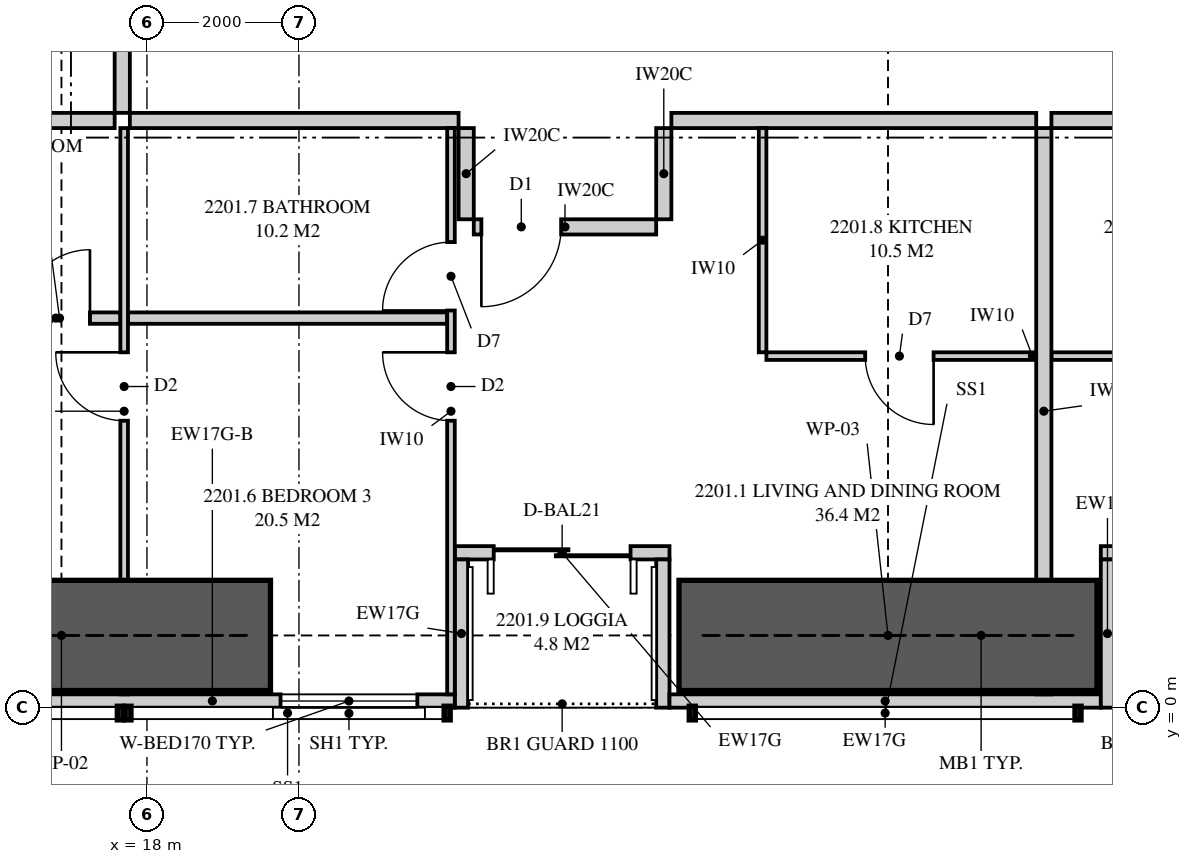
"""IFC4 building model, lengths in metres.
Left out: names, types, materials, properties, quantities, classifications, styles, units other than length and angle.
Written with IfcOpenShell. Run it as: python <this file> out.ifc"""

import sys

from ifc_helpers import new_model, si_unit, direction, frame, frame_2d, origin, place, context, subcontext, project, spatial, polyline, rectangle, outline, extrude, element, fill, save


model = new_model("IFC4")
c1 = context("Model", 3, precision=1e-05, world=origin(), true_north=direction((0.0, 1.0)))
c2 = subcontext(c1, "Body", "Model", "MODEL_VIEW")
j1 = project(units=[si_unit("LENGTHUNIT", "METRE"), si_unit("PLANEANGLEUNIT", "RADIAN")], contexts=[c1])
p1 = place(None, origin())
s1 = spatial("IfcSite", under=j1, at=p1, CompositionType="ELEMENT")
p2 = place(p1, origin())
s2 = spatial("IfcBuilding", under=s1, at=p2, CompositionType="ELEMENT")
p3 = place(p2, frame((0.0, 0.0, 84.75)))
s3 = spatial("IfcBuildingStorey", under=s2, at=p3, CompositionType="ELEMENT", Elevation=84.75)
p4 = place(p3, frame((15.671, 0.087, 0.0), z_axis=(0.0, 0.0, 1.0), x_axis=(1.0, 0.0, 0.0)))
e1 = element("IfcWall", 1, at=p4, inside=s3, PredefinedType="SOLIDWALL", context=c2, shape_type="SweptSolid", body=[
    extrude(rectangle(XDim=6.379, YDim=0.175, at=frame_2d((3.189, 0.0))), origin(), (0.0, 0.0, 1.0), 2.15),
])
p5 = place(p4, frame((4.087, 0.0, 0.4)))
e2 = element("IfcOpeningElement", 2, at=p5, cuts=e1, PredefinedType="OPENING", context=c2, shape_type="SweptSolid", body=[
    extrude(rectangle(XDim=1.8, YDim=1.7, at=frame_2d((0.9, 0.85))), frame((0.0, 0.097, 0.0), z_axis=(0.0, -1.0, 0.0), x_axis=(1.0, 0.0, 0.0)), (0.0, 0.0, 1.0), 0.195),
])
p6 = place(p3, frame((24.875, 0.087, 0.0), z_axis=(0.0, 0.0, 1.0), x_axis=(1.0, 0.0, 0.0)))
e3 = element("IfcWall", 3, at=p6, inside=s3, PredefinedType="SOLIDWALL", context=c2, shape_type="SweptSolid", body=[
    extrude(rectangle(XDim=5.675, YDim=0.175, at=frame_2d((2.837, 0.0))), origin(), (0.0, 0.0, 1.0), 2.15),
])
p7 = place(p3, frame((22.05, 2.038, 0.0), z_axis=(0.0, 0.0, 1.0), x_axis=(1.0, 0.0, 0.0)))
e4 = element("IfcWall", 4, at=p7, inside=s3, PredefinedType="SOLIDWALL", context=c2, shape_type="SweptSolid", body=[
    extrude(rectangle(XDim=2.825, YDim=0.175, at=frame_2d((1.413, 0.0))), origin(), (0.0, 0.0, 1.0), 2.15),
])
p8 = place(p7, frame((0.512, 0.0, 0.0)))
e5 = element("IfcOpeningElement", 5, at=p8, cuts=e4, PredefinedType="OPENING", context=c2, shape_type="SweptSolid", body=[
    extrude(rectangle(XDim=1.8, YDim=2.1, at=frame_2d((0.9, 1.05))), frame((0.0, 0.097, 0.0), z_axis=(0.0, -1.0, 0.0), x_axis=(1.0, 0.0, 0.0)), (0.0, 0.0, 1.0), 0.195),
])
for number, where, z_axis, x_axis in (
    (6, (22.137, 0.0, 0.0), (0.0, 0.0, 1.0), (0.0, 1.0, 0.0)),
    (7, (24.788, 0.0, 0.0), (0.0, 0.0, 1.0), (0.0, 1.0, 0.0)),
):
    element("IfcWall", number, at=place(p3, frame(where, z_axis=z_axis, x_axis=x_axis)), inside=s3, PredefinedType="SOLIDWALL", context=c2, shape_type="SweptSolid", body=[
        extrude(rectangle(XDim=1.95, YDim=0.175, at=frame_2d((0.975, 0.0))), origin(), (0.0, 0.0, 1.0), 2.15),
    ])
p9 = place(p3, frame((30.55, 2.038, 0.0), z_axis=(0.0, 0.0, 1.0), x_axis=(1.0, 0.0, 0.0)))
e8 = element("IfcWall", 8, at=p9, inside=s3, PredefinedType="SOLIDWALL", context=c2, shape_type="SweptSolid", body=[
    extrude(rectangle(XDim=3.05, YDim=0.175, at=frame_2d((1.525, 0.0))), origin(), (0.0, 0.0, 1.0), 2.15),
])
p10 = place(p9, frame((0.625, 0.0, 0.0)))
e9 = element("IfcOpeningElement", 9, at=p10, cuts=e8, PredefinedType="OPENING", context=c2, shape_type="SweptSolid", body=[
    extrude(rectangle(XDim=1.8, YDim=2.1, at=frame_2d((0.9, 1.05))), frame((0.0, 0.097, 0.0), z_axis=(0.0, -1.0, 0.0), x_axis=(1.0, 0.0, 0.0)), (0.0, 0.0, 1.0), 0.195),
])
p11 = place(p3, frame((30.637, 0.0, 0.0), z_axis=(0.0, 0.0, 1.0), x_axis=(0.0, 1.0, 0.0)))
e10 = element("IfcWall", 10, at=p11, inside=s3, PredefinedType="SOLIDWALL", context=c2, shape_type="SweptSolid", body=[
    extrude(rectangle(XDim=1.95, YDim=0.175, at=frame_2d((0.975, 0.0))), origin(), (0.0, 0.0, 1.0), 2.15),
])
p12 = place(p3, frame((29.8, 0.175, 0.0), z_axis=(0.0, 0.0, 1.0), x_axis=(0.0, 1.0, 0.0)))
e11 = element("IfcWall", 11, at=p12, inside=s3, PredefinedType="PARTITIONING", context=c2, shape_type="SweptSolid", body=[
    extrude(outline(polyline([(0.0, 0.0), (7.45, 0.0), (7.45, 3.11), (1.885, 3.11), (1.885, 2.15), (1.021, 2.15), (1.021, 1.986), (0.529, 1.986), (0.529, 2.15), (0.0, 2.15), (0.0, 0.0)])), frame((0.0, 0.1, 0.0), z_axis=(0.0, -1.0, 0.0), x_axis=(1.0, 0.0, 0.0)), (0.0, 0.0, 1.0), 0.2),
])
p13 = place(p3, frame((17.775, 7.725, 0.0), z_axis=(0.0, 0.0, 1.0), x_axis=(1.0, 0.0, 0.0)))
e12 = element("IfcWall", 12, at=p13, inside=s3, PredefinedType="PARTITIONING", context=c2, shape_type="SweptSolid", body=[
    extrude(rectangle(XDim=4.325, YDim=0.2, at=frame_2d((2.163, 0.0))), origin(), (0.0, 0.0, 1.0), 3.11),
])
p14 = place(p3, frame((17.7, 0.175, 0.0), z_axis=(0.0, 0.0, 1.0), x_axis=(0.0, 1.0, 0.0)))
e13 = element("IfcWall", 13, at=p14, inside=s3, PredefinedType="PARTITIONING", context=c2, shape_type="SweptSolid", body=[
    extrude(outline(polyline([(1.835, 2.15), (0.0, 2.15), (0.0, 0.0), (0.529, 0.0), (0.529, 0.625), (1.021, 0.625), (1.021, 0.0), (7.45, 0.0), (7.45, 3.11), (1.835, 3.11), (1.835, 2.15)]), holes=[polyline([(1.021, 1.075), (0.529, 1.075), (0.529, 1.905), (1.021, 1.905), (1.021, 1.075)])]), frame((0.0, 0.05, 0.0), z_axis=(0.0, -1.0, 0.0), x_axis=(1.0, 0.0, 0.0)), (0.0, 0.0, 1.0), 0.1),
])
p15 = place(p14, frame((3.6, 0.0, 0.0)))
e14 = element("IfcOpeningElement", 14, at=p15, cuts=e13, PredefinedType="OPENING", context=c2, shape_type="SweptSolid", body=[
    extrude(rectangle(XDim=0.9, YDim=2.1, at=frame_2d((0.45, 1.05))), frame((0.0, 0.06, 0.0), z_axis=(0.0, -1.0, 0.0), x_axis=(1.0, 0.0, 0.0)), (0.0, 0.0, 1.0), 0.12),
])
p16 = place(p3, frame((22.0, 0.175, 0.0), z_axis=(0.0, 0.0, 1.0), x_axis=(0.0, 1.0, 0.0)))
e15 = element("IfcWall", 15, at=p16, inside=s3, PredefinedType="PARTITIONING", context=c2, shape_type="SweptSolid", body=[
    extrude(outline(polyline([(0.0, 0.0), (7.45, 0.0), (7.45, 3.11), (1.835, 3.11), (1.835, 2.15), (0.0, 2.15), (0.0, 3.11), (0.0, 0.0)])), frame((0.0, 0.05, 0.0), z_axis=(0.0, -1.0, 0.0), x_axis=(1.0, 0.0, 0.0)), (0.0, 0.0, 1.0), 0.1),
])
p17 = place(p16, frame((3.6, 0.0, 0.0)))
e16 = element("IfcOpeningElement", 16, at=p17, cuts=e15, PredefinedType="OPENING", context=c2, shape_type="SweptSolid", body=[
    extrude(rectangle(XDim=0.9, YDim=2.1, at=frame_2d((0.45, 1.05))), frame((0.0, 0.06, 0.0), z_axis=(0.0, -1.0, 0.0), x_axis=(1.0, 0.0, 0.0)), (0.0, 0.0, 1.0), 0.12),
])
p18 = place(p16, frame((5.05, 0.0, 0.0)))
e17 = element("IfcOpeningElement", 17, at=p18, cuts=e15, PredefinedType="OPENING", context=c2, shape_type="SweptSolid", body=[
    extrude(rectangle(XDim=0.9, YDim=2.1, at=frame_2d((0.45, 1.05))), frame((0.0, 0.06, 0.0), z_axis=(0.0, -1.0, 0.0), x_axis=(1.0, 0.0, 0.0)), (0.0, 0.0, 1.0), 0.12),
])
p19 = place(p3, frame((11.75, 5.125, 0.0), z_axis=(0.0, 0.0, 1.0), x_axis=(1.0, 0.0, 0.0)))
e18 = element("IfcWall", 18, at=p19, inside=s3, PredefinedType="PLUMBINGWALL", context=c2, shape_type="SweptSolid", body=[
    extrude(outline(polyline([(0.0, 0.0), (5.9, 0.0), (5.9, 3.11), (5.446, 3.11), (5.446, 2.531), (4.804, 2.531), (4.804, 3.11), (0.0, 3.11), (0.0, 0.0)])), frame((0.0, 0.075, 0.0), z_axis=(0.0, -1.0, 0.0), x_axis=(1.0, 0.0, 0.0)), (0.0, 0.0, 1.0), 0.15),
])
p20 = place(p19, frame((4.6, 0.0, 0.0)))
e19 = element("IfcOpeningElement", 19, at=p20, cuts=e18, PredefinedType="OPENING", context=c2, shape_type="SweptSolid", body=[
    extrude(rectangle(XDim=0.9, YDim=2.1, at=frame_2d((0.45, 1.05))), frame((0.0, 0.085, 0.0), z_axis=(0.0, -1.0, 0.0), x_axis=(1.0, 0.0, 0.0)), (0.0, 0.0, 1.0), 0.17),
])
p21 = place(p3, frame((17.75, 5.125, 0.0), z_axis=(0.0, 0.0, 1.0), x_axis=(1.0, 0.0, 0.0)))
e20 = element("IfcWall", 20, at=p21, inside=s3, PredefinedType="PLUMBINGWALL", context=c2, shape_type="SweptSolid", body=[
    extrude(rectangle(XDim=4.2, YDim=0.15, at=frame_2d((2.1, 0.0))), origin(), (0.0, 0.0, 1.0), 3.11),
])
p22 = place(p3, frame((26.15, 4.625, 0.0), z_axis=(0.0, 0.0, 1.0), x_axis=(1.0, 0.0, 0.0)))
e21 = element("IfcWall", 21, at=p22, inside=s3, PredefinedType="PARTITIONING", context=c2, shape_type="SweptSolid", body=[
    extrude(outline(polyline([(0.0, 0.0), (3.55, 0.0), (3.55, 3.11), (1.896, 3.11), (1.896, 2.531), (1.304, 2.531), (1.304, 3.11), (0.0, 3.11), (0.0, 0.0)])), frame((0.0, 0.05, 0.0), z_axis=(0.0, -1.0, 0.0), x_axis=(1.0, 0.0, 0.0)), (0.0, 0.0, 1.0), 0.1),
])
p23 = place(p22, frame((1.3, 0.0, 0.0)))
e22 = element("IfcOpeningElement", 22, at=p23, cuts=e21, PredefinedType="OPENING", context=c2, shape_type="SweptSolid", body=[
    extrude(rectangle(XDim=0.9, YDim=2.1, at=frame_2d((0.45, 1.05))), frame((0.0, 0.06, 0.0), z_axis=(0.0, -1.0, 0.0), x_axis=(1.0, 0.0, 0.0)), (0.0, 0.0, 1.0), 0.12),
])
p24 = place(p3, frame((26.1, 4.675, 0.0), z_axis=(0.0, 0.0, 1.0), x_axis=(0.0, 1.0, 0.0)))
e23 = element("IfcWall", 23, at=p24, inside=s3, PredefinedType="PARTITIONING", context=c2, shape_type="SweptSolid", body=[
    extrude(rectangle(XDim=2.95, YDim=0.1, at=frame_2d((1.475, 0.0))), origin(), (0.0, 0.0, 1.0), 3.11),
])
p25 = place(p3, frame((29.9, 7.725, 0.0), z_axis=(0.0, 0.0, 1.0), x_axis=(1.0, 0.0, 0.0)))
e24 = element("IfcWall", 24, at=p25, inside=s3, PredefinedType="PARTITIONING", context=c2, shape_type="SweptSolid", body=[
    extrude(rectangle(XDim=7.825, YDim=0.2, at=frame_2d((3.913, 0.0))), origin(), (0.0, 0.0, 1.0), 3.11),
])
p26 = place(p25, frame((3.413, 0.0, 0.0)))
e25 = element("IfcOpeningElement", 25, at=p26, cuts=e24, PredefinedType="OPENING", context=c2, shape_type="SweptSolid", body=[
    extrude(rectangle(XDim=1.05, YDim=2.2, at=frame_2d((0.525, 1.1))), frame((0.0, 0.11, 0.0), z_axis=(0.0, -1.0, 0.0), x_axis=(1.0, 0.0, 0.0)), (0.0, 0.0, 1.0), 0.22),
])
p27 = place(p3, frame((29.9, 4.625, 0.0), z_axis=(0.0, 0.0, 1.0), x_axis=(1.0, 0.0, 0.0)))
e26 = element("IfcWall", 26, at=p27, inside=s3, PredefinedType="PARTITIONING", context=c2, shape_type="SweptSolid", body=[
    extrude(rectangle(XDim=3.25, YDim=0.1, at=frame_2d((1.625, 0.0))), origin(), (0.0, 0.0, 1.0), 3.11),
])
p28 = place(p27, frame((1.2, 0.0, 0.0)))
e27 = element("IfcOpeningElement", 27, at=p28, cuts=e26, PredefinedType="OPENING", context=c2, shape_type="SweptSolid", body=[
    extrude(rectangle(XDim=0.9, YDim=2.1, at=frame_2d((0.45, 1.05))), frame((0.0, 0.06, 0.0), z_axis=(0.0, -1.0, 0.0), x_axis=(1.0, 0.0, 0.0)), (0.0, 0.0, 1.0), 0.12),
])
p29 = place(p3, frame((6.0, 7.725, 0.0), z_axis=(0.0, 0.0, 1.0), x_axis=(1.0, 0.0, 0.0)))
e28 = element("IfcWall", 28, at=p29, inside=s3, PredefinedType="PARTITIONING", context=c2, shape_type="SweptSolid", body=[
    extrude(outline(polyline([(0.0, 0.0), (11.575, 0.0), (11.575, 3.11), (11.221, 3.11), (11.221, 2.531), (10.529, 2.531), (10.529, 3.11), (5.51, 3.11), (5.51, 2.51), (2.978, 2.51), (2.978, 2.531), (2.93, 2.531), (2.93, 2.15), (0.681, 2.15), (0.681, 3.11), (0.0, 3.11), (0.0, 0.0)])), frame((0.0, 0.1, 0.0), z_axis=(0.0, -1.0, 0.0), x_axis=(1.0, 0.0, 0.0)), (0.0, 0.0, 1.0), 0.2),
])
p30 = place(p3, frame((17.675, 7.825, 0.0), z_axis=(0.0, 0.0, 1.0), x_axis=(0.0, 1.0, 0.0)))
e29 = element("IfcWall", 29, at=p30, inside=s3, PredefinedType="PARTITIONING", context=c2, shape_type="SweptSolid", body=[
    extrude(outline(polyline([(0.0, 0.0), (9.075, 0.0), (9.075, 3.11), (3.096, 3.11), (3.096, 2.531), (2.404, 2.531), (2.404, 3.11), (0.0, 3.11), (0.0, 0.0)])), frame((0.0, 0.1, 0.0), z_axis=(0.0, -1.0, 0.0), x_axis=(1.0, 0.0, 0.0)), (0.0, 0.0, 1.0), 0.2),
])
p31 = place(p3, frame((24.9, 7.725, 0.0), z_axis=(0.0, 0.0, 1.0), x_axis=(1.0, 0.0, 0.0)))
e30 = element("IfcWall", 30, at=p31, inside=s3, PredefinedType="PARTITIONING", context=c2, shape_type="SweptSolid", body=[
    extrude(outline(polyline([(0.0, 0.0), (4.8, 0.0), (4.8, 3.11), (3.196, 3.11), (3.196, 2.531), (2.504, 2.531), (2.504, 3.11), (0.0, 3.11), (0.0, 0.0)])), frame((0.0, 0.1, 0.0), z_axis=(0.0, -1.0, 0.0), x_axis=(1.0, 0.0, 0.0)), (0.0, 0.0, 1.0), 0.2),
])
p32 = place(p3, frame((22.3, 6.325, 0.0), z_axis=(0.0, 0.0, 1.0), x_axis=(1.0, 0.0, 0.0)))
e31 = element("IfcWall", 31, at=p32, inside=s3, PredefinedType="PARTITIONING", context=c2, shape_type="SweptSolid", body=[
    extrude(rectangle(XDim=2.4, YDim=0.2, at=frame_2d((1.2, 0.0))), origin(), (0.0, 0.0, 1.0), 3.11),
])
p33 = place(p32, frame((0.1, 0.0, 0.0)))
e32 = element("IfcOpeningElement", 32, at=p33, cuts=e31, PredefinedType="OPENING", context=c2, shape_type="SweptSolid", body=[
    extrude(rectangle(XDim=1.05, YDim=2.2, at=frame_2d((0.525, 1.1))), frame((0.0, 0.11, 0.0), z_axis=(0.0, -1.0, 0.0), x_axis=(1.0, 0.0, 0.0)), (0.0, 0.0, 1.0), 0.22),
])
for number, where, z_axis, x_axis in (
    (33, (22.2, 7.625, 0.0), (0.0, 0.0, 1.0), (0.0, -1.0, 0.0)),
    (34, (24.8, 7.625, 0.0), (0.0, 0.0, 1.0), (0.0, -1.0, 0.0)),
):
    element("IfcWall", number, at=place(p3, frame(where, z_axis=z_axis, x_axis=x_axis)), inside=s3, PredefinedType="PARTITIONING", context=c2, shape_type="SweptSolid", body=[
        extrude(rectangle(XDim=1.2, YDim=0.2, at=frame_2d((0.6, 0.0))), origin(), (0.0, 0.0, 1.0), 3.11),
    ])
for number, where, z_axis, x_axis in (
    (35, (14.125, 0.95, 0.0), (0.0, 0.0, 1.0), (1.0, 0.0, 0.0)),
    (36, (25.0, 0.95, 0.0), (0.0, 0.0, 1.0), (1.0, 0.0, 0.0)),
):
    element("IfcWall", number, at=place(p3, frame(where, z_axis=z_axis, x_axis=x_axis)), inside=s3, PredefinedType="SHEAR", context=c2, shape_type="SweptSolid", body=[
        extrude(rectangle(XDim=5.5, YDim=1.45, at=frame_2d((2.75, 0.0))), origin(), (0.0, 0.0, 1.0), 3.35),
    ])
p34 = place(p5, origin())
e37 = element("IfcWindow", 37, at=p34, inside=s3, PartitioningType="SINGLE_PANEL", PredefinedType="WINDOW", context=c2, shape_type="SweptSolid", body=[
    extrude(rectangle(XDim=1.8, YDim=1.7, at=frame_2d((0.9, 0.85))), frame((0.0, 0.03, 0.0), z_axis=(0.0, -1.0, 0.0), x_axis=(1.0, 0.0, 0.0)), (0.0, 0.0, 1.0), 0.06),
])
fill(e2, e37)
p35 = place(p8, origin())
e38 = element("IfcDoor", 38, at=p35, inside=s3, OperationType="SLIDING_TO_LEFT", PredefinedType="DOOR", context=c2, shape_type="SweptSolid", body=[
    extrude(rectangle(XDim=1.8, YDim=2.1, at=frame_2d((0.9, 1.05))), frame((0.0, 0.025, 0.0), z_axis=(0.0, -1.0, 0.0), x_axis=(1.0, 0.0, 0.0)), (0.0, 0.0, 1.0), 0.05),
])
fill(e5, e38)
p36 = place(p33, frame((1.05, 0.0, 0.0), z_axis=(0.0, 0.0, 1.0), x_axis=(-1.0, 0.0, 0.0)))
e39 = element("IfcDoor", 39, at=p36, inside=s3, OperationType="SINGLE_SWING_RIGHT", PredefinedType="DOOR", context=c2, shape_type="SweptSolid", body=[
    extrude(rectangle(XDim=1.05, YDim=2.2, at=frame_2d((0.525, 1.1))), frame((0.0, 0.025, 0.0), z_axis=(0.0, -1.0, 0.0), x_axis=(1.0, 0.0, 0.0)), (0.0, 0.0, 1.0), 0.05),
])
fill(e32, e39)
p37 = place(p15, origin())
e40 = element("IfcDoor", 40, at=p37, inside=s3, OperationType="SINGLE_SWING_RIGHT", PredefinedType="DOOR", context=c2, shape_type="SweptSolid", body=[
    extrude(rectangle(XDim=0.9, YDim=2.1, at=frame_2d((0.45, 1.05))), frame((0.0, 0.025, 0.0), z_axis=(0.0, -1.0, 0.0), x_axis=(1.0, 0.0, 0.0)), (0.0, 0.0, 1.0), 0.05),
])
fill(e14, e40)
p38 = place(p20, origin())
e41 = element("IfcDoor", 41, at=p38, inside=s3, OperationType="SINGLE_SWING_RIGHT", PredefinedType="DOOR", context=c2, shape_type="SweptSolid", body=[
    extrude(rectangle(XDim=0.9, YDim=2.1, at=frame_2d((0.45, 1.05))), frame((0.0, 0.025, 0.0), z_axis=(0.0, -1.0, 0.0), x_axis=(1.0, 0.0, 0.0)), (0.0, 0.0, 1.0), 0.05),
])
fill(e19, e41)
p39 = place(p17, origin())
e42 = element("IfcDoor", 42, at=p39, inside=s3, OperationType="SINGLE_SWING_RIGHT", PredefinedType="DOOR", context=c2, shape_type="SweptSolid", body=[
    extrude(rectangle(XDim=0.9, YDim=2.1, at=frame_2d((0.45, 1.05))), frame((0.0, 0.025, 0.0), z_axis=(0.0, -1.0, 0.0), x_axis=(1.0, 0.0, 0.0)), (0.0, 0.0, 1.0), 0.05),
])
fill(e16, e42)
p40 = place(p18, origin())
e43 = element("IfcDoor", 43, at=p40, inside=s3, OperationType="SINGLE_SWING_LEFT", PredefinedType="DOOR", context=c2, shape_type="SweptSolid", body=[
    extrude(rectangle(XDim=0.9, YDim=2.1, at=frame_2d((0.45, 1.05))), frame((0.0, 0.025, 0.0), z_axis=(0.0, -1.0, 0.0), x_axis=(1.0, 0.0, 0.0)), (0.0, 0.0, 1.0), 0.05),
])
fill(e17, e43)
p41 = place(p23, frame((0.9, 0.0, 0.0), z_axis=(0.0, 0.0, 1.0), x_axis=(-1.0, 0.0, 0.0)))
e44 = element("IfcDoor", 44, at=p41, inside=s3, OperationType="SINGLE_SWING_LEFT", PredefinedType="DOOR", context=c2, shape_type="SweptSolid", body=[
    extrude(rectangle(XDim=0.9, YDim=2.1, at=frame_2d((0.45, 1.05))), frame((0.0, 0.025, 0.0), z_axis=(0.0, -1.0, 0.0), x_axis=(1.0, 0.0, 0.0)), (0.0, 0.0, 1.0), 0.05),
])
fill(e22, e44)
save(model, sys.argv[1])
